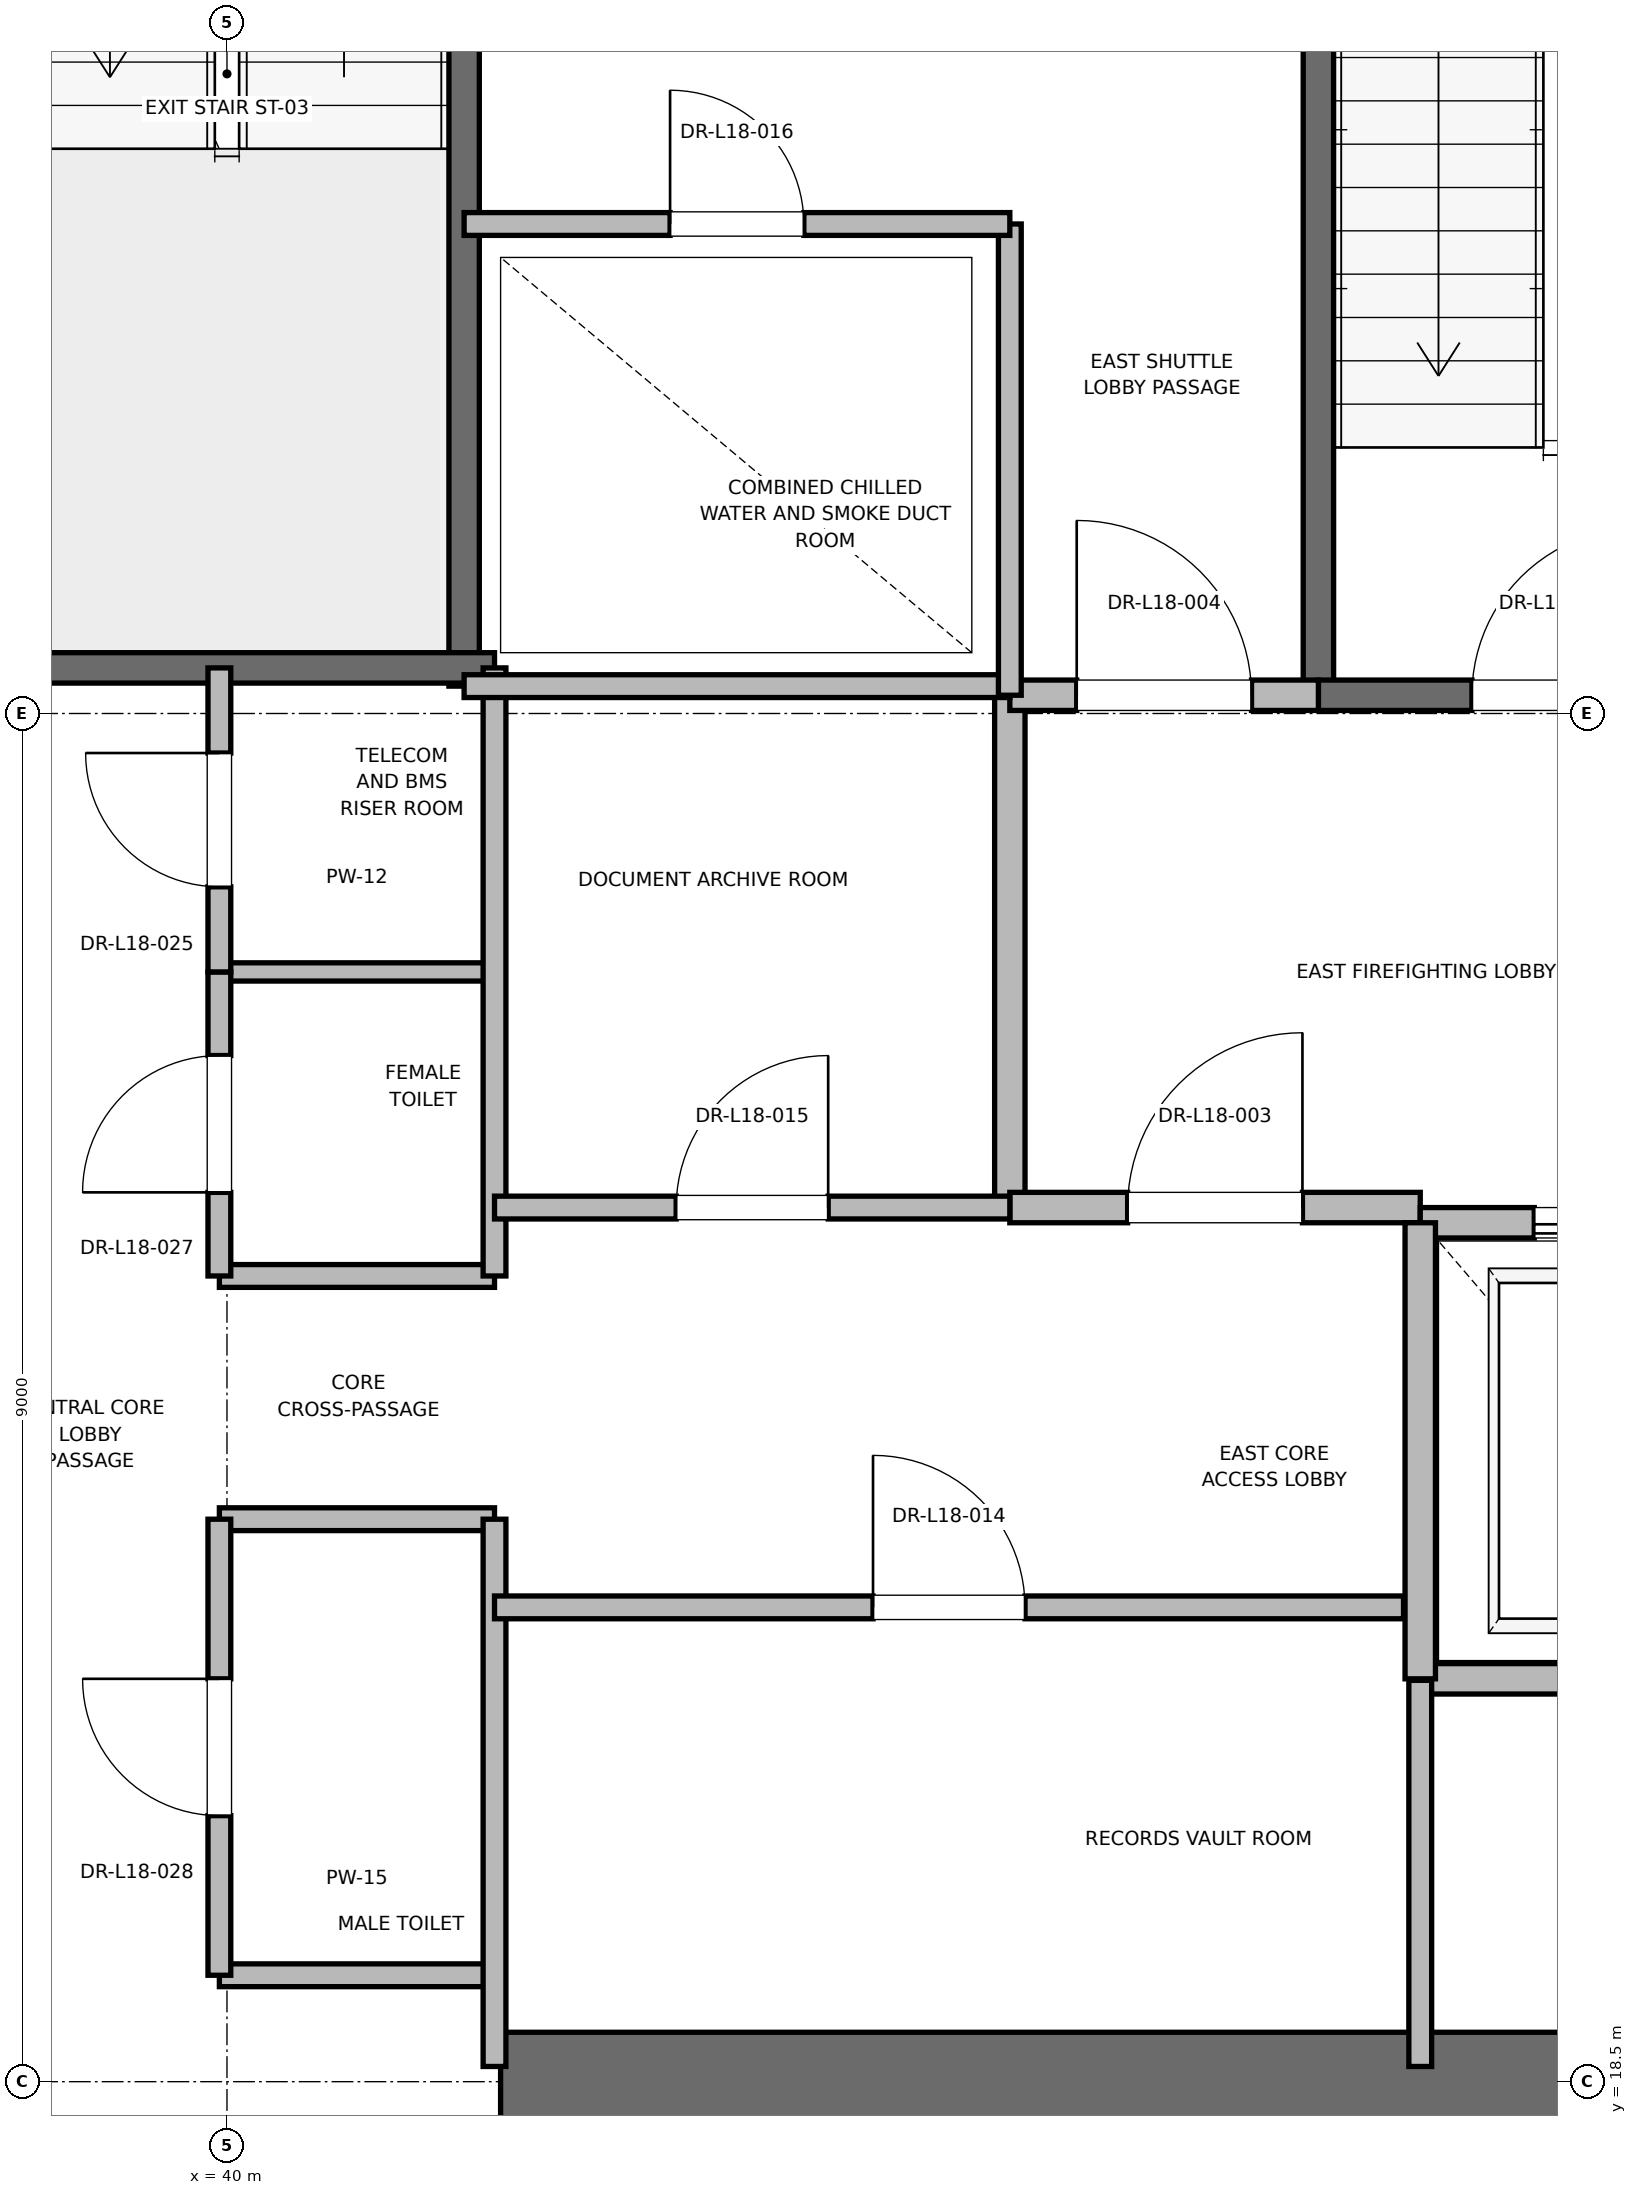
"""IFC4 building model, lengths in metres.
Left out: names, types, materials, properties, quantities, classifications, styles, units other than length and angle.
Written with IfcOpenShell. Run it as: python <this file> out.ifc"""

import sys

from ifc_helpers import new_model, si_unit, direction, frame, frame_2d, origin, place, context, subcontext, project, spatial, rectangle, extrude, element, fill, save


model = new_model("IFC4")
c1 = context("Model", 3, precision=1e-05, world=origin(), true_north=direction((0.0, 1.0)))
c2 = subcontext(c1, "Body", "Model", "MODEL_VIEW")
j1 = project(units=[si_unit("LENGTHUNIT", "METRE"), si_unit("PLANEANGLEUNIT", "RADIAN")], contexts=[c1])
p1 = place(None, origin())
s1 = spatial("IfcSite", under=j1, at=p1, CompositionType="ELEMENT")
p2 = place(p1, origin())
s2 = spatial("IfcBuilding", under=s1, at=p2, CompositionType="ELEMENT")
p3 = place(p2, frame((0.0, 0.0, 79.6)))
s3 = spatial("IfcBuildingStorey", under=s2, at=p3, CompositionType="ELEMENT", Elevation=79.6)
p4 = place(p3, frame((41.8, 18.5, 0.0), z_axis=(0.0, 0.0, 1.0), x_axis=(1.0, 0.0, 0.0)))
e1 = element("IfcWall", 1, at=p4, inside=s3, PredefinedType="SHEAR", context=c2, shape_type="SweptSolid", body=[
    extrude(rectangle(XDim=9.2, YDim=0.65, at=frame_2d((4.6, 0.0))), origin(), (0.0, 0.0, 1.0), 3.76),
])
p5 = place(p3, frame((47.18, 27.62, 0.0), z_axis=(0.0, 0.0, 1.0), x_axis=(0.0, 1.0, 0.0)))
e2 = element("IfcWall", 2, at=p5, inside=s3, PredefinedType="SOLIDWALL", context=c2, shape_type="SweptSolid", body=[
    extrude(rectangle(XDim=8.18, YDim=0.2, at=frame_2d((4.09, 0.0))), origin(), (0.0, 0.0, 1.0), 3.76),
])
p6 = place(p3, frame((47.18, 27.62, 0.0), z_axis=(0.0, 0.0, 1.0), x_axis=(1.0, 0.0, 0.0)))
e3 = element("IfcWall", 3, at=p6, inside=s3, PredefinedType="SOLIDWALL", context=c2, shape_type="SweptSolid", body=[
    extrude(rectangle(XDim=3.12, YDim=0.2, at=frame_2d((1.56, 0.0))), origin(), (0.0, 0.0, 1.0), 3.76),
])
p7 = place(p6, frame((1.01, 0.0, 0.0)))
e4 = element("IfcOpeningElement", 4, at=p7, cuts=e3, PredefinedType="OPENING", context=c2, shape_type="SweptSolid", body=[
    extrude(rectangle(XDim=1.1, YDim=2.15, at=frame_2d((0.55, 1.075))), frame((0.0, 0.1, 0.0), z_axis=(0.0, -1.0, 0.0), x_axis=(1.0, 0.0, 0.0)), (0.0, 0.0, 1.0), 0.2),
])
p8 = place(p3, frame((41.56, 27.68, 0.0), z_axis=(0.0, 0.0, 1.0), x_axis=(0.0, 1.0, 0.0)))
e5 = element("IfcWall", 5, at=p8, inside=s3, PredefinedType="SOLIDWALL", context=c2, shape_type="SweptSolid", body=[
    extrude(rectangle(XDim=8.57, YDim=0.2, at=frame_2d((4.285, 0.0))), origin(), (0.0, 0.0, 1.0), 3.76),
])
p9 = place(p3, frame((38.44, 27.8, 0.0), z_axis=(0.0, 0.0, 1.0), x_axis=(1.0, 0.0, 0.0)))
e6 = element("IfcWall", 6, at=p9, inside=s3, PredefinedType="SOLIDWALL", context=c2, shape_type="SweptSolid", body=[
    extrude(rectangle(XDim=3.32, YDim=0.2, at=frame_2d((1.66, 0.0))), origin(), (0.0, 0.0, 1.0), 3.76),
])
p10 = place(p3, frame((45.15, 24.25, 0.0), z_axis=(0.0, 0.0, 1.0), x_axis=(0.0, 1.0, 0.0)))
e7 = element("IfcWall", 7, at=p10, inside=s3, PredefinedType="PARTITIONING", context=c2, shape_type="SweptSolid", body=[
    extrude(rectangle(XDim=3.37, YDim=0.2, at=frame_2d((1.685, 0.0))), origin(), (0.0, 0.0, 1.0), 3.76),
])
p11 = place(p3, frame((45.15, 24.25, 0.0), z_axis=(0.0, 0.0, 1.0), x_axis=(1.0, 0.0, 0.0)))
e8 = element("IfcWall", 8, at=p11, inside=s3, PredefinedType="PARTITIONING", context=c2, shape_type="SweptSolid", body=[
    extrude(rectangle(XDim=2.7, YDim=0.2, at=frame_2d((1.35, 0.0))), origin(), (0.0, 0.0, 1.0), 3.76),
])
p12 = place(p11, frame((0.775, 0.0, 0.0)))
e9 = element("IfcOpeningElement", 9, at=p12, cuts=e8, PredefinedType="OPENING", context=c2, shape_type="SweptSolid", body=[
    extrude(rectangle(XDim=1.15, YDim=2.2, at=frame_2d((0.575, 1.1))), frame((0.0, 0.1, 0.0), z_axis=(0.0, -1.0, 0.0), x_axis=(1.0, 0.0, 0.0)), (0.0, 0.0, 1.0), 0.2),
])
p13 = place(p3, frame((45.15, 27.62, 0.0), z_axis=(0.0, 0.0, 1.0), x_axis=(1.0, 0.0, 0.0)))
e10 = element("IfcWall", 10, at=p13, inside=s3, PredefinedType="PARTITIONING", context=c2, shape_type="SweptSolid", body=[
    extrude(rectangle(XDim=2.03, YDim=0.2, at=frame_2d((1.015, 0.0))), origin(), (0.0, 0.0, 1.0), 3.76),
])
p14 = place(p13, frame((0.44, 0.0, 0.0)))
e11 = element("IfcOpeningElement", 11, at=p14, cuts=e10, PredefinedType="OPENING", context=c2, shape_type="SweptSolid", body=[
    extrude(rectangle(XDim=1.15, YDim=2.2, at=frame_2d((0.575, 1.1))), frame((0.0, 0.1, 0.0), z_axis=(0.0, -1.0, 0.0), x_axis=(1.0, 0.0, 0.0)), (0.0, 0.0, 1.0), 0.2),
])
p15 = place(p3, frame((47.85, 21.15, 0.0), z_axis=(0.0, 0.0, 1.0), x_axis=(1.0, 0.0, 0.0)))
e12 = element("IfcWall", 12, at=p15, inside=s3, PredefinedType="SOLIDWALL", context=c2, shape_type="SweptSolid", body=[
    extrude(rectangle(XDim=2.6, YDim=0.2, at=frame_2d((1.3, 0.0))), origin(), (0.0, 0.0, 1.0), 3.76),
])
p16 = place(p3, frame((50.45, 24.15, 0.0), z_axis=(0.0, 0.0, 1.0), x_axis=(-1.0, 0.0, 0.0)))
e13 = element("IfcWall", 13, at=p16, inside=s3, PredefinedType="SOLIDWALL", context=c2, shape_type="SweptSolid", body=[
    extrude(rectangle(XDim=2.6, YDim=0.2, at=frame_2d((1.3, 0.0))), origin(), (0.0, 0.0, 1.0), 2.54),
])
p17 = place(p16, frame((0.75, 0.0, 0.0)))
e14 = element("IfcOpeningElement", 14, at=p17, cuts=e13, PredefinedType="OPENING", context=c2, shape_type="SweptSolid", body=[
    extrude(rectangle(XDim=1.1, YDim=2.2, at=frame_2d((0.55, 1.1))), frame((0.0, 0.1, 0.0), z_axis=(0.0, -1.0, 0.0), x_axis=(1.0, 0.0, 0.0)), (0.0, 0.0, 1.0), 0.2),
])
p18 = place(p3, frame((47.85, 24.15, 0.0), z_axis=(0.0, 0.0, 1.0), x_axis=(0.0, -1.0, 0.0)))
e15 = element("IfcWall", 15, at=p18, inside=s3, PredefinedType="SOLIDWALL", context=c2, shape_type="SweptSolid", body=[
    extrude(rectangle(XDim=3.0, YDim=0.2, at=frame_2d((1.5, 0.0))), origin(), (0.0, 0.0, 1.0), 3.76),
])
for number, where, z_axis, x_axis in (
    (16, (39.95, 19.2, 0.0), (0.0, 0.0, 1.0), (1.0, 0.0, 0.0)),
    (17, (39.95, 22.2, 0.0), (0.0, 0.0, 1.0), (1.0, 0.0, 0.0)),
    (18, (39.95, 23.8, 0.0), (0.0, 0.0, 1.0), (1.0, 0.0, 0.0)),
):
    element("IfcWall", number, at=place(p3, frame(where, z_axis=z_axis, x_axis=x_axis)), inside=s3, PredefinedType="PARTITIONING", context=c2, shape_type="SweptSolid", body=[
        extrude(rectangle(XDim=1.81, YDim=0.15, at=frame_2d((0.905, 0.0))), origin(), (0.0, 0.0, 1.0), 2.85),
    ])
p19 = place(p3, frame((39.95, 25.8, 0.0), z_axis=(0.0, 0.0, 1.0), x_axis=(1.0, 0.0, 0.0)))
e19 = element("IfcWall", 19, at=p19, inside=s3, PredefinedType="PARTITIONING", context=c2, shape_type="SweptSolid", body=[
    extrude(rectangle(XDim=1.81, YDim=0.12, at=frame_2d((0.905, 0.0))), origin(), (0.0, 0.0, 1.0), 2.85),
])
p20 = place(p3, frame((41.76, 18.6, 0.0), z_axis=(0.0, 0.0, 1.0), x_axis=(0.0, 1.0, 0.0)))
e20 = element("IfcWall", 20, at=p20, inside=s3, PredefinedType="PARTITIONING", context=c2, shape_type="SweptSolid", body=[
    extrude(rectangle(XDim=3.6, YDim=0.15, at=frame_2d((1.8, 0.0))), origin(), (0.0, 0.0, 1.0), 2.54),
])
p21 = place(p3, frame((41.76, 23.8, 0.0), z_axis=(0.0, 0.0, 1.0), x_axis=(0.0, 1.0, 0.0)))
e21 = element("IfcWall", 21, at=p21, inside=s3, PredefinedType="PARTITIONING", context=c2, shape_type="SweptSolid", body=[
    extrude(rectangle(XDim=4.0, YDim=0.15, at=frame_2d((2.0, 0.0))), origin(), (0.0, 0.0, 1.0), 2.85),
])
p22 = place(p3, frame((39.95, 19.2, 0.0), z_axis=(0.0, 0.0, 1.0), x_axis=(0.0, 1.0, 0.0)))
e22 = element("IfcWall", 22, at=p22, inside=s3, PredefinedType="PARTITIONING", context=c2, shape_type="SweptSolid", body=[
    extrude(rectangle(XDim=3.0, YDim=0.15, at=frame_2d((1.5, 0.0))), origin(), (0.0, 0.0, 1.0), 2.85),
])
p23 = place(p22, frame((1.05, 0.0, 0.0)))
e23 = element("IfcOpeningElement", 23, at=p23, cuts=e22, PredefinedType="OPENING", context=c2, shape_type="SweptSolid", body=[
    extrude(rectangle(XDim=0.9, YDim=2.1, at=frame_2d((0.45, 1.05))), frame((0.0, 0.075, 0.0), z_axis=(0.0, -1.0, 0.0), x_axis=(1.0, 0.0, 0.0)), (0.0, 0.0, 1.0), 0.15),
])
p24 = place(p3, frame((39.95, 23.8, 0.0), z_axis=(0.0, 0.0, 1.0), x_axis=(0.0, 1.0, 0.0)))
e24 = element("IfcWall", 24, at=p24, inside=s3, PredefinedType="PARTITIONING", context=c2, shape_type="SweptSolid", body=[
    extrude(rectangle(XDim=2.0, YDim=0.15, at=frame_2d((1.0, 0.0))), origin(), (0.0, 0.0, 1.0), 2.85),
])
p25 = place(p24, frame((0.55, 0.0, 0.0)))
e25 = element("IfcOpeningElement", 25, at=p25, cuts=e24, PredefinedType="OPENING", context=c2, shape_type="SweptSolid", body=[
    extrude(rectangle(XDim=0.9, YDim=2.1, at=frame_2d((0.45, 1.05))), frame((0.0, 0.075, 0.0), z_axis=(0.0, -1.0, 0.0), x_axis=(1.0, 0.0, 0.0)), (0.0, 0.0, 1.0), 0.15),
])
p26 = place(p3, frame((39.95, 25.8, 0.0), z_axis=(0.0, 0.0, 1.0), x_axis=(0.0, 1.0, 0.0)))
e26 = element("IfcWall", 26, at=p26, inside=s3, PredefinedType="PARTITIONING", context=c2, shape_type="SweptSolid", body=[
    extrude(rectangle(XDim=2.0, YDim=0.15, at=frame_2d((1.0, 0.0))), origin(), (0.0, 0.0, 1.0), 2.85),
])
p27 = place(p26, frame((0.56, 0.0, 0.0)))
e27 = element("IfcOpeningElement", 27, at=p27, cuts=e26, PredefinedType="OPENING", context=c2, shape_type="SweptSolid", body=[
    extrude(rectangle(XDim=0.88, YDim=2.1, at=frame_2d((0.44, 1.05))), frame((0.0, 0.075, 0.0), z_axis=(0.0, -1.0, 0.0), x_axis=(1.0, 0.0, 0.0)), (0.0, 0.0, 1.0), 0.15),
])
p28 = place(p3, frame((41.56, 27.68, 0.0), z_axis=(0.0, 0.0, 1.0), x_axis=(1.0, 0.0, 0.0)))
e28 = element("IfcWall", 28, at=p28, inside=s3, PredefinedType="PARTITIONING", context=c2, shape_type="SweptSolid", body=[
    extrude(rectangle(XDim=3.59, YDim=0.15, at=frame_2d((1.795, 0.0))), origin(), (0.0, 0.0, 1.0), 2.85),
])
p29 = place(p3, frame((47.85, 18.6, 0.0), z_axis=(0.0, 0.0, 1.0), x_axis=(0.0, 1.0, 0.0)))
e29 = element("IfcWall", 29, at=p29, inside=s3, PredefinedType="PARTITIONING", context=c2, shape_type="SweptSolid", body=[
    extrude(rectangle(XDim=2.54, YDim=0.15, at=frame_2d((1.27, 0.0))), origin(), (0.0, 0.0, 1.0), 2.85),
])
p30 = place(p3, frame((41.76, 21.62, 0.0), z_axis=(0.0, 0.0, 1.0), x_axis=(1.0, 0.0, 0.0)))
e30 = element("IfcWall", 30, at=p30, inside=s3, PredefinedType="PARTITIONING", context=c2, shape_type="SweptSolid", body=[
    extrude(rectangle(XDim=5.98, YDim=0.15, at=frame_2d((2.99, 0.0))), origin(), (0.0, 0.0, 1.0), 2.85),
])
p31 = place(p30, frame((2.49, 0.0, 0.0)))
e31 = element("IfcOpeningElement", 31, at=p31, cuts=e30, PredefinedType="OPENING", context=c2, shape_type="SweptSolid", body=[
    extrude(rectangle(XDim=1.0, YDim=2.15, at=frame_2d((0.5, 1.075))), frame((0.0, 0.075, 0.0), z_axis=(0.0, -1.0, 0.0), x_axis=(1.0, 0.0, 0.0)), (0.0, 0.0, 1.0), 0.15),
])
p32 = place(p3, frame((41.76, 24.25, 0.0), z_axis=(0.0, 0.0, 1.0), x_axis=(1.0, 0.0, 0.0)))
e32 = element("IfcWall", 32, at=p32, inside=s3, PredefinedType="PARTITIONING", context=c2, shape_type="SweptSolid", body=[
    extrude(rectangle(XDim=3.39, YDim=0.15, at=frame_2d((1.695, 0.0))), origin(), (0.0, 0.0, 1.0), 2.85),
])
p33 = place(p32, frame((1.195, 0.0, 0.0)))
e33 = element("IfcOpeningElement", 33, at=p33, cuts=e32, PredefinedType="OPENING", context=c2, shape_type="SweptSolid", body=[
    extrude(rectangle(XDim=1.0, YDim=2.15, at=frame_2d((0.5, 1.075))), frame((0.0, 0.075, 0.0), z_axis=(0.0, -1.0, 0.0), x_axis=(1.0, 0.0, 0.0)), (0.0, 0.0, 1.0), 0.15),
])
p34 = place(p3, frame((45.15, 27.62, 0.0), z_axis=(0.0, 0.0, 1.0), x_axis=(0.0, 1.0, 0.0)))
e34 = element("IfcWall", 34, at=p34, inside=s3, PredefinedType="PARTITIONING", context=c2, shape_type="SweptSolid", body=[
    extrude(rectangle(XDim=3.1, YDim=0.15, at=frame_2d((1.55, 0.0))), origin(), (0.0, 0.0, 1.0), 2.85),
])
p35 = place(p3, frame((41.56, 30.72, 0.0), z_axis=(0.0, 0.0, 1.0), x_axis=(1.0, 0.0, 0.0)))
e35 = element("IfcWall", 35, at=p35, inside=s3, PredefinedType="PARTITIONING", context=c2, shape_type="SweptSolid", body=[
    extrude(rectangle(XDim=3.59, YDim=0.15, at=frame_2d((1.795, 0.0))), origin(), (0.0, 0.0, 1.0), 2.85),
])
p36 = place(p35, frame((1.355, 0.0, 0.0)))
e36 = element("IfcOpeningElement", 36, at=p36, cuts=e35, PredefinedType="OPENING", context=c2, shape_type="SweptSolid", body=[
    extrude(rectangle(XDim=0.88, YDim=2.1, at=frame_2d((0.44, 1.05))), frame((0.0, 0.075, 0.0), z_axis=(0.0, -1.0, 0.0), x_axis=(1.0, 0.0, 0.0)), (0.0, 0.0, 1.0), 0.15),
])
p37 = place(p7, origin())
e37 = element("IfcDoor", 37, at=p37, inside=s3, OperationType="SINGLE_SWING_RIGHT", PredefinedType="DOOR", context=c2, shape_type="SweptSolid", body=[
    extrude(rectangle(XDim=1.1, YDim=2.15, at=frame_2d((0.55, 1.075))), frame((0.0, 0.025, 0.0), z_axis=(0.0, -1.0, 0.0), x_axis=(1.0, 0.0, 0.0)), (0.0, 0.0, 1.0), 0.05),
])
fill(e4, e37)
p38 = place(p12, origin())
e38 = element("IfcDoor", 38, at=p38, inside=s3, OperationType="SINGLE_SWING_RIGHT", PredefinedType="DOOR", context=c2, shape_type="SweptSolid", body=[
    extrude(rectangle(XDim=1.15, YDim=2.2, at=frame_2d((0.575, 1.1))), frame((0.0, 0.025, 0.0), z_axis=(0.0, -1.0, 0.0), x_axis=(1.0, 0.0, 0.0)), (0.0, 0.0, 1.0), 0.05),
])
fill(e9, e38)
p39 = place(p14, origin())
e39 = element("IfcDoor", 39, at=p39, inside=s3, OperationType="SINGLE_SWING_LEFT", PredefinedType="DOOR", context=c2, shape_type="SweptSolid", body=[
    extrude(rectangle(XDim=1.15, YDim=2.2, at=frame_2d((0.575, 1.1))), frame((0.0, 0.025, 0.0), z_axis=(0.0, -1.0, 0.0), x_axis=(1.0, 0.0, 0.0)), (0.0, 0.0, 1.0), 0.05),
])
fill(e11, e39)
p40 = place(p17, origin())
e40 = element("IfcDoor", 40, at=p40, inside=s3, OperationType="SLIDING_TO_RIGHT", PredefinedType="DOOR", context=c2, shape_type="SweptSolid", body=[
    extrude(rectangle(XDim=1.1, YDim=2.2, at=frame_2d((0.55, 1.1))), frame((0.0, 0.025, 0.0), z_axis=(0.0, -1.0, 0.0), x_axis=(1.0, 0.0, 0.0)), (0.0, 0.0, 1.0), 0.05),
])
fill(e14, e40)
p41 = place(p23, origin())
e41 = element("IfcDoor", 41, at=p41, inside=s3, OperationType="SINGLE_SWING_RIGHT", PredefinedType="DOOR", context=c2, shape_type="SweptSolid", body=[
    extrude(rectangle(XDim=0.9, YDim=2.1, at=frame_2d((0.45, 1.05))), frame((0.0, 0.025, 0.0), z_axis=(0.0, -1.0, 0.0), x_axis=(1.0, 0.0, 0.0)), (0.0, 0.0, 1.0), 0.05),
])
fill(e23, e41)
p42 = place(p25, origin())
e42 = element("IfcDoor", 42, at=p42, inside=s3, OperationType="SINGLE_SWING_LEFT", PredefinedType="DOOR", context=c2, shape_type="SweptSolid", body=[
    extrude(rectangle(XDim=0.9, YDim=2.1, at=frame_2d((0.45, 1.05))), frame((0.0, 0.025, 0.0), z_axis=(0.0, -1.0, 0.0), x_axis=(1.0, 0.0, 0.0)), (0.0, 0.0, 1.0), 0.05),
])
fill(e25, e42)
p43 = place(p27, origin())
e43 = element("IfcDoor", 43, at=p43, inside=s3, OperationType="SINGLE_SWING_RIGHT", PredefinedType="DOOR", context=c2, shape_type="SweptSolid", body=[
    extrude(rectangle(XDim=0.88, YDim=2.1, at=frame_2d((0.44, 1.05))), frame((0.0, 0.025, 0.0), z_axis=(0.0, -1.0, 0.0), x_axis=(1.0, 0.0, 0.0)), (0.0, 0.0, 1.0), 0.05),
])
fill(e27, e43)
p44 = place(p31, origin())
e44 = element("IfcDoor", 44, at=p44, inside=s3, OperationType="SINGLE_SWING_LEFT", PredefinedType="DOOR", context=c2, shape_type="SweptSolid", body=[
    extrude(rectangle(XDim=1.0, YDim=2.15, at=frame_2d((0.5, 1.075))), frame((0.0, 0.025, 0.0), z_axis=(0.0, -1.0, 0.0), x_axis=(1.0, 0.0, 0.0)), (0.0, 0.0, 1.0), 0.05),
])
fill(e31, e44)
p45 = place(p33, origin())
e45 = element("IfcDoor", 45, at=p45, inside=s3, OperationType="SINGLE_SWING_RIGHT", PredefinedType="DOOR", context=c2, shape_type="SweptSolid", body=[
    extrude(rectangle(XDim=1.0, YDim=2.15, at=frame_2d((0.5, 1.075))), frame((0.0, 0.025, 0.0), z_axis=(0.0, -1.0, 0.0), x_axis=(1.0, 0.0, 0.0)), (0.0, 0.0, 1.0), 0.05),
])
fill(e33, e45)
p46 = place(p36, origin())
e46 = element("IfcDoor", 46, at=p46, inside=s3, OperationType="SINGLE_SWING_LEFT", PredefinedType="DOOR", context=c2, shape_type="SweptSolid", body=[
    extrude(rectangle(XDim=0.88, YDim=2.1, at=frame_2d((0.44, 1.05))), frame((0.0, 0.025, 0.0), z_axis=(0.0, -1.0, 0.0), x_axis=(1.0, 0.0, 0.0)), (0.0, 0.0, 1.0), 0.05),
])
fill(e36, e46)
save(model, sys.argv[1])
